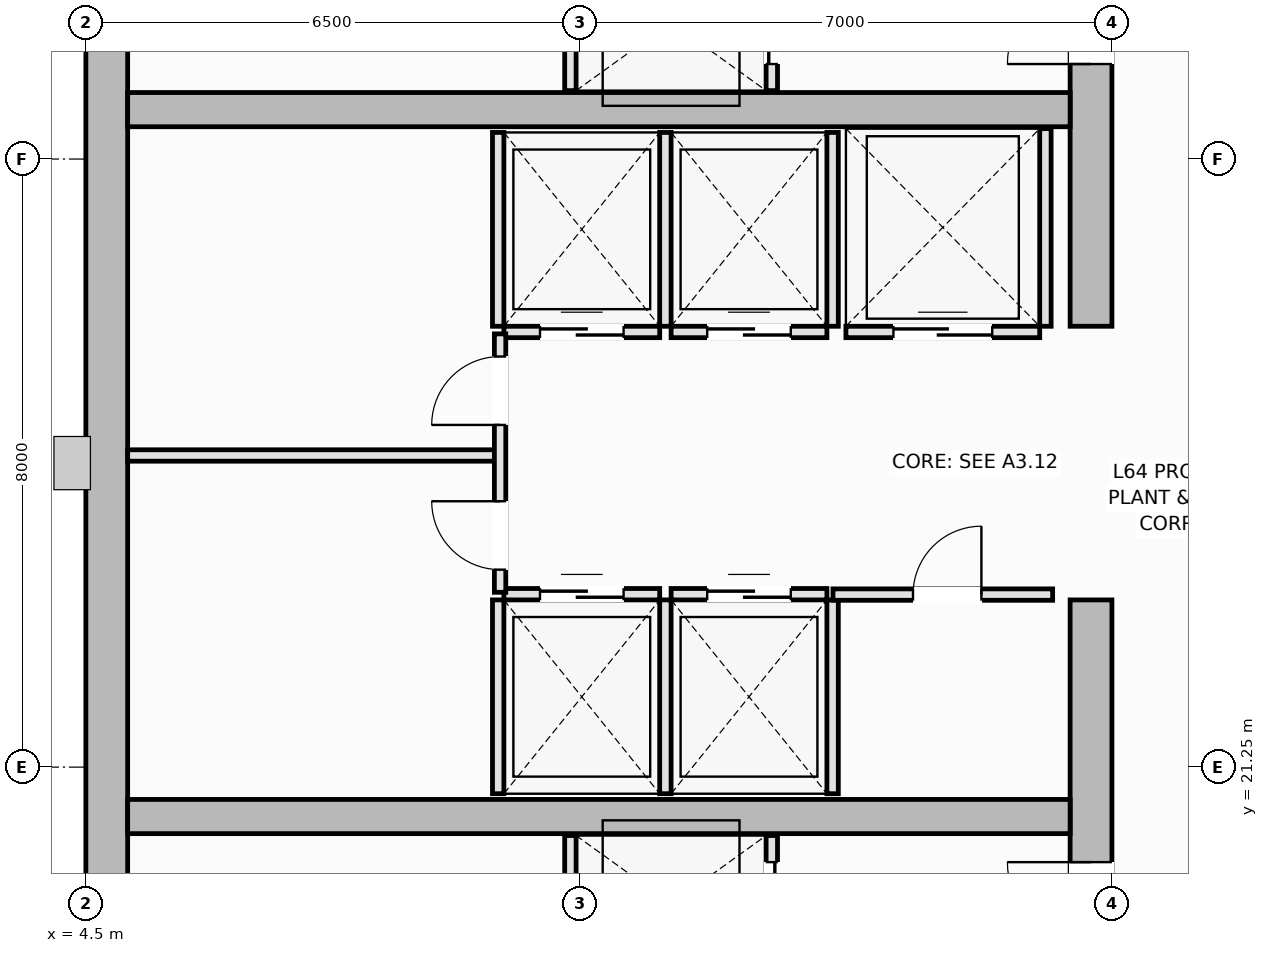
"""IFC4 building model, lengths in metres.
Left out: names, types, materials, properties, quantities, classifications, styles, units other than length and angle.
Written with IfcOpenShell. Run it as: python <this file> out.ifc"""

import sys

from ifc_helpers import new_model, si_unit, direction, frame, frame_2d, origin, place, context, subcontext, project, spatial, rectangle, extrude, element, fill, save


model = new_model("IFC4")
c1 = context("Model", 3, precision=1e-05, world=origin(), true_north=direction((0.0, 1.0)))
c2 = subcontext(c1, "Body", "Model", "MODEL_VIEW")
j1 = project(units=[si_unit("LENGTHUNIT", "METRE"), si_unit("PLANEANGLEUNIT", "RADIAN")], contexts=[c1])
p1 = place(None, origin())
s1 = spatial("IfcSite", under=j1, at=p1, CompositionType="ELEMENT")
p2 = place(p1, origin())
s2 = spatial("IfcBuilding", under=s1, at=p2, CompositionType="ELEMENT")
p3 = place(p2, frame((0.0, 0.0, 241.3)))
s3 = spatial("IfcBuildingStorey", under=s2, at=p3, CompositionType="ELEMENT", Elevation=241.3)
p4 = place(p3, frame((4.775, 14.55, 0.0), z_axis=(0.0, 0.0, 1.0), x_axis=(0.0, 1.0, 0.0)))
e1 = element("IfcWall", 1, at=p4, inside=s3, PredefinedType="SHEAR", context=c2, shape_type="SweptSolid", body=[
    extrude(rectangle(XDim=21.4, YDim=0.55, at=frame_2d((10.7, 0.0))), origin(), (0.0, 0.0, 1.0), 3.55),
])
p5 = place(p3, frame((17.725, 14.55, 0.0), z_axis=(0.0, 0.0, 1.0), x_axis=(0.0, 1.0, 0.0)))
e2 = element("IfcWall", 2, at=p5, inside=s3, PredefinedType="SHEAR", context=c2, shape_type="SweptSolid", body=[
    extrude(rectangle(XDim=8.9, YDim=0.55, at=frame_2d((4.45, 0.0))), origin(), (0.0, 0.0, 1.0), 3.55),
])
p6 = place(p5, frame((4.35, 0.0, 0.0)))
e3 = element("IfcOpeningElement", 3, at=p6, cuts=e2, PredefinedType="OPENING", context=c2, shape_type="SweptSolid", body=[
    extrude(rectangle(XDim=1.1, YDim=2.15, at=frame_2d((0.55, 1.075))), frame((0.0, 0.285, 0.0), z_axis=(0.0, -1.0, 0.0), x_axis=(1.0, 0.0, 0.0)), (0.0, 0.0, 1.0), 0.57),
])
p7 = place(p3, frame((17.725, 27.05, 0.0), z_axis=(0.0, 0.0, 1.0), x_axis=(0.0, 1.0, 0.0)))
e4 = element("IfcWall", 4, at=p7, inside=s3, PredefinedType="SHEAR", context=c2, shape_type="SweptSolid", body=[
    extrude(rectangle(XDim=8.9, YDim=0.55, at=frame_2d((4.45, 0.0))), origin(), (0.0, 0.0, 1.0), 3.55),
])
p8 = place(p7, frame((3.45, 0.0, 0.0)))
e5 = element("IfcOpeningElement", 5, at=p8, cuts=e4, PredefinedType="OPENING", context=c2, shape_type="SweptSolid", body=[
    extrude(rectangle(XDim=1.1, YDim=2.15, at=frame_2d((0.55, 1.075))), frame((0.0, 0.285, 0.0), z_axis=(0.0, -1.0, 0.0), x_axis=(1.0, 0.0, 0.0)), (0.0, 0.0, 1.0), 0.57),
])
for number, where, z_axis, x_axis in (
    (6, (5.05, 20.6, 0.0), (0.0, 0.0, 1.0), (1.0, 0.0, 0.0)),
    (7, (5.05, 29.9, 0.0), (0.0, 0.0, 1.0), (1.0, 0.0, 0.0)),
):
    element("IfcWall", number, at=place(p3, frame(where, z_axis=z_axis, x_axis=x_axis)), inside=s3, PredefinedType="SHEAR", context=c2, shape_type="SweptSolid", body=[
        extrude(rectangle(XDim=12.4, YDim=0.45, at=frame_2d((6.2, 0.0))), origin(), (0.0, 0.0, 1.0), 3.55),
    ])
p9 = place(p3, frame((10.0, 23.525, 0.0), z_axis=(0.0, 0.0, 1.0), x_axis=(1.0, 0.0, 0.0)))
e8 = element("IfcWall", 8, at=p9, inside=s3, PredefinedType="PARTITIONING", context=c2, shape_type="SweptSolid", body=[
    extrude(rectangle(XDim=2.05, YDim=0.15, at=frame_2d((1.025, 0.0))), origin(), (0.0, 0.0, 1.0), 3.39),
])
p10 = place(p9, frame((0.475, 0.0, 0.0)))
e9 = element("IfcOpeningElement", 9, at=p10, cuts=e8, PredefinedType="OPENING", context=c2, shape_type="SweptSolid", body=[
    extrude(rectangle(XDim=1.1, YDim=2.2, at=frame_2d((0.55, 1.1))), frame((0.0, 0.085, 0.0), z_axis=(0.0, -1.0, 0.0), x_axis=(1.0, 0.0, 0.0)), (0.0, 0.0, 1.0), 0.17),
])
for number, where, z_axis, x_axis in (
    (10, (9.925, 20.9, 0.0), (0.0, 0.0, 1.0), (0.0, 1.0, 0.0)),
    (11, (12.125, 20.9, 0.0), (0.0, 0.0, 1.0), (0.0, 1.0, 0.0)),
):
    element("IfcWall", number, at=place(p3, frame(where, z_axis=z_axis, x_axis=x_axis)), inside=s3, PredefinedType="PARTITIONING", context=c2, shape_type="SweptSolid", body=[
        extrude(rectangle(XDim=2.55, YDim=0.15, at=frame_2d((1.275, 0.0))), origin(), (0.0, 0.0, 1.0), 3.39),
    ])
p11 = place(p3, frame((12.2, 23.525, 0.0), z_axis=(0.0, 0.0, 1.0), x_axis=(1.0, 0.0, 0.0)))
e12 = element("IfcWall", 12, at=p11, inside=s3, PredefinedType="PARTITIONING", context=c2, shape_type="SweptSolid", body=[
    extrude(rectangle(XDim=2.05, YDim=0.15, at=frame_2d((1.025, 0.0))), origin(), (0.0, 0.0, 1.0), 3.39),
])
p12 = place(p11, frame((0.475, 0.0, 0.0)))
e13 = element("IfcOpeningElement", 13, at=p12, cuts=e12, PredefinedType="OPENING", context=c2, shape_type="SweptSolid", body=[
    extrude(rectangle(XDim=1.1, YDim=2.2, at=frame_2d((0.55, 1.1))), frame((0.0, 0.085, 0.0), z_axis=(0.0, -1.0, 0.0), x_axis=(1.0, 0.0, 0.0)), (0.0, 0.0, 1.0), 0.17),
])
p13 = place(p3, frame((14.325, 20.9, 0.0), z_axis=(0.0, 0.0, 1.0), x_axis=(0.0, 1.0, 0.0)))
e14 = element("IfcWall", 14, at=p13, inside=s3, PredefinedType="PARTITIONING", context=c2, shape_type="SweptSolid", body=[
    extrude(rectangle(XDim=2.55, YDim=0.15, at=frame_2d((1.275, 0.0))), origin(), (0.0, 0.0, 1.0), 3.39),
])
p14 = place(p3, frame((10.0, 26.975, 0.0), z_axis=(0.0, 0.0, 1.0), x_axis=(1.0, 0.0, 0.0)))
e15 = element("IfcWall", 15, at=p14, inside=s3, PredefinedType="PARTITIONING", context=c2, shape_type="SweptSolid", body=[
    extrude(rectangle(XDim=2.05, YDim=0.15, at=frame_2d((1.025, 0.0))), origin(), (0.0, 0.0, 1.0), 3.39),
])
p15 = place(p14, frame((0.475, 0.0, 0.0)))
e16 = element("IfcOpeningElement", 16, at=p15, cuts=e15, PredefinedType="OPENING", context=c2, shape_type="SweptSolid", body=[
    extrude(rectangle(XDim=1.1, YDim=2.2, at=frame_2d((0.55, 1.1))), frame((0.0, 0.085, 0.0), z_axis=(0.0, -1.0, 0.0), x_axis=(1.0, 0.0, 0.0)), (0.0, 0.0, 1.0), 0.17),
])
for number, where, z_axis, x_axis in (
    (17, (9.925, 27.05, 0.0), (0.0, 0.0, 1.0), (0.0, 1.0, 0.0)),
    (18, (12.125, 27.05, 0.0), (0.0, 0.0, 1.0), (0.0, 1.0, 0.0)),
):
    element("IfcWall", number, at=place(p3, frame(where, z_axis=z_axis, x_axis=x_axis)), inside=s3, PredefinedType="PARTITIONING", context=c2, shape_type="SweptSolid", body=[
        extrude(rectangle(XDim=2.55, YDim=0.15, at=frame_2d((1.275, 0.0))), origin(), (0.0, 0.0, 1.0), 3.39),
    ])
p16 = place(p3, frame((12.2, 26.975, 0.0), z_axis=(0.0, 0.0, 1.0), x_axis=(1.0, 0.0, 0.0)))
e19 = element("IfcWall", 19, at=p16, inside=s3, PredefinedType="PARTITIONING", context=c2, shape_type="SweptSolid", body=[
    extrude(rectangle(XDim=2.05, YDim=0.15, at=frame_2d((1.025, 0.0))), origin(), (0.0, 0.0, 1.0), 3.39),
])
p17 = place(p16, frame((0.475, 0.0, 0.0)))
e20 = element("IfcOpeningElement", 20, at=p17, cuts=e19, PredefinedType="OPENING", context=c2, shape_type="SweptSolid", body=[
    extrude(rectangle(XDim=1.1, YDim=2.2, at=frame_2d((0.55, 1.1))), frame((0.0, 0.085, 0.0), z_axis=(0.0, -1.0, 0.0), x_axis=(1.0, 0.0, 0.0)), (0.0, 0.0, 1.0), 0.17),
])
p18 = place(p3, frame((14.325, 27.05, 0.0), z_axis=(0.0, 0.0, 1.0), x_axis=(0.0, 1.0, 0.0)))
e21 = element("IfcWall", 21, at=p18, inside=s3, PredefinedType="PARTITIONING", context=c2, shape_type="SweptSolid", body=[
    extrude(rectangle(XDim=2.55, YDim=0.15, at=frame_2d((1.275, 0.0))), origin(), (0.0, 0.0, 1.0), 3.39),
])
p19 = place(p3, frame((14.5, 26.975, 0.0), z_axis=(0.0, 0.0, 1.0), x_axis=(1.0, 0.0, 0.0)))
e22 = element("IfcWall", 22, at=p19, inside=s3, PredefinedType="PARTITIONING", context=c2, shape_type="SweptSolid", body=[
    extrude(rectangle(XDim=2.55, YDim=0.15, at=frame_2d((1.275, 0.0))), origin(), (0.0, 0.0, 1.0), 3.39),
])
p20 = place(p19, frame((0.625, 0.0, 0.0)))
e23 = element("IfcOpeningElement", 23, at=p20, cuts=e22, PredefinedType="OPENING", context=c2, shape_type="SweptSolid", body=[
    extrude(rectangle(XDim=1.3, YDim=2.2, at=frame_2d((0.65, 1.1))), frame((0.0, 0.085, 0.0), z_axis=(0.0, -1.0, 0.0), x_axis=(1.0, 0.0, 0.0)), (0.0, 0.0, 1.0), 0.17),
])
p21 = place(p3, frame((17.125, 27.05, 0.0), z_axis=(0.0, 0.0, 1.0), x_axis=(0.0, 1.0, 0.0)))
e24 = element("IfcWall", 24, at=p21, inside=s3, PredefinedType="PARTITIONING", context=c2, shape_type="SweptSolid", body=[
    extrude(rectangle(XDim=2.6, YDim=0.15, at=frame_2d((1.3, 0.0))), origin(), (0.0, 0.0, 1.0), 3.39),
])
p22 = place(p3, frame((10.875, 18.55, 0.0), z_axis=(0.0, 0.0, 1.0), x_axis=(0.0, 1.0, 0.0)))
e25 = element("IfcWall", 25, at=p22, inside=s3, PredefinedType="PARTITIONING", context=c2, shape_type="SweptSolid", body=[
    extrude(rectangle(XDim=1.8, YDim=0.15, at=frame_2d((0.9, 0.0))), origin(), (0.0, 0.0, 1.0), 3.39),
])
p23 = place(p3, frame((13.525, 18.55, 0.0), z_axis=(0.0, 0.0, 1.0), x_axis=(0.0, 1.0, 0.0)))
e26 = element("IfcWall", 26, at=p23, inside=s3, PredefinedType="PARTITIONING", context=c2, shape_type="SweptSolid", body=[
    extrude(rectangle(XDim=1.8, YDim=0.15, at=frame_2d((0.9, 0.0))), origin(), (0.0, 0.0, 1.0), 3.39),
])
p24 = place(p23, frame((0.35, 0.0, 0.0)))
e27 = element("IfcOpeningElement", 27, at=p24, cuts=e26, PredefinedType="OPENING", context=c2, shape_type="SweptSolid", body=[
    extrude(rectangle(XDim=1.1, YDim=2.2, at=frame_2d((0.55, 1.1))), frame((0.0, 0.085, 0.0), z_axis=(0.0, -1.0, 0.0), x_axis=(1.0, 0.0, 0.0)), (0.0, 0.0, 1.0), 0.17),
])
p25 = place(p3, frame((10.875, 30.15, 0.0), z_axis=(0.0, 0.0, 1.0), x_axis=(0.0, 1.0, 0.0)))
e28 = element("IfcWall", 28, at=p25, inside=s3, PredefinedType="PARTITIONING", context=c2, shape_type="SweptSolid", body=[
    extrude(rectangle(XDim=1.8, YDim=0.15, at=frame_2d((0.9, 0.0))), origin(), (0.0, 0.0, 1.0), 3.39),
])
p26 = place(p3, frame((13.525, 30.15, 0.0), z_axis=(0.0, 0.0, 1.0), x_axis=(0.0, 1.0, 0.0)))
e29 = element("IfcWall", 29, at=p26, inside=s3, PredefinedType="PARTITIONING", context=c2, shape_type="SweptSolid", body=[
    extrude(rectangle(XDim=1.8, YDim=0.15, at=frame_2d((0.9, 0.0))), origin(), (0.0, 0.0, 1.0), 3.39),
])
p27 = place(p26, frame((0.35, 0.0, 0.0)))
e30 = element("IfcOpeningElement", 30, at=p27, cuts=e29, PredefinedType="OPENING", context=c2, shape_type="SweptSolid", body=[
    extrude(rectangle(XDim=1.1, YDim=2.2, at=frame_2d((0.55, 1.1))), frame((0.0, 0.085, 0.0), z_axis=(0.0, -1.0, 0.0), x_axis=(1.0, 0.0, 0.0)), (0.0, 0.0, 1.0), 0.17),
])
p28 = place(p3, frame((5.05, 25.35, 0.0), z_axis=(0.0, 0.0, 1.0), x_axis=(1.0, 0.0, 0.0)))
e31 = element("IfcWall", 31, at=p28, inside=s3, PredefinedType="PARTITIONING", context=c2, shape_type="SweptSolid", body=[
    extrude(rectangle(XDim=4.9, YDim=0.15, at=frame_2d((2.45, 0.0))), origin(), (0.0, 0.0, 1.0), 3.39),
])
p29 = place(p3, frame((9.95, 23.55, 0.0), z_axis=(0.0, 0.0, 1.0), x_axis=(0.0, 1.0, 0.0)))
e32 = element("IfcWall", 32, at=p29, inside=s3, PredefinedType="PARTITIONING", context=c2, shape_type="SweptSolid", body=[
    extrude(rectangle(XDim=3.4, YDim=0.15, at=frame_2d((1.7, 0.0))), origin(), (0.0, 0.0, 1.0), 3.39),
])
p30 = place(p29, frame((0.298, 0.0, 0.0)))
e33 = element("IfcOpeningElement", 33, at=p30, cuts=e32, PredefinedType="OPENING", context=c2, shape_type="SweptSolid", body=[
    extrude(rectangle(XDim=0.9, YDim=2.1, at=frame_2d((0.45, 1.05))), frame((0.0, 0.085, 0.0), z_axis=(0.0, -1.0, 0.0), x_axis=(1.0, 0.0, 0.0)), (0.0, 0.0, 1.0), 0.17),
])
p31 = place(p29, frame((2.202, 0.0, 0.0)))
e34 = element("IfcOpeningElement", 34, at=p31, cuts=e32, PredefinedType="OPENING", context=c2, shape_type="SweptSolid", body=[
    extrude(rectangle(XDim=0.9, YDim=2.1, at=frame_2d((0.45, 1.05))), frame((0.0, 0.085, 0.0), z_axis=(0.0, -1.0, 0.0), x_axis=(1.0, 0.0, 0.0)), (0.0, 0.0, 1.0), 0.17),
])
p32 = place(p3, frame((14.33, 23.52, 0.0), z_axis=(0.0, 0.0, 1.0), x_axis=(1.0, 0.0, 0.0)))
e35 = element("IfcWall", 35, at=p32, inside=s3, PredefinedType="PARTITIONING", context=c2, shape_type="SweptSolid", body=[
    extrude(rectangle(XDim=2.89, YDim=0.15, at=frame_2d((1.445, 0.0))), origin(), (0.0, 0.0, 1.0), 3.39),
])
p33 = place(p32, frame((1.053, 0.0, 0.0)))
e36 = element("IfcOpeningElement", 36, at=p33, cuts=e35, PredefinedType="OPENING", context=c2, shape_type="SweptSolid", body=[
    extrude(rectangle(XDim=0.9, YDim=2.1, at=frame_2d((0.45, 1.05))), frame((0.0, 0.085, 0.0), z_axis=(0.0, -1.0, 0.0), x_axis=(1.0, 0.0, 0.0)), (0.0, 0.0, 1.0), 0.17),
])
p34 = place(p10, origin())
e37 = element("IfcDoor", 37, at=p34, inside=s3, OperationType="DOUBLE_DOOR_SLIDING", PredefinedType="DOOR", context=c2, shape_type="SweptSolid", body=[
    extrude(rectangle(XDim=1.1, YDim=2.2, at=frame_2d((0.55, 1.1))), frame((0.0, 0.025, 0.0), z_axis=(0.0, -1.0, 0.0), x_axis=(1.0, 0.0, 0.0)), (0.0, 0.0, 1.0), 0.05),
])
fill(e9, e37)
p35 = place(p12, origin())
e38 = element("IfcDoor", 38, at=p35, inside=s3, OperationType="DOUBLE_DOOR_SLIDING", PredefinedType="DOOR", context=c2, shape_type="SweptSolid", body=[
    extrude(rectangle(XDim=1.1, YDim=2.2, at=frame_2d((0.55, 1.1))), frame((0.0, 0.025, 0.0), z_axis=(0.0, -1.0, 0.0), x_axis=(1.0, 0.0, 0.0)), (0.0, 0.0, 1.0), 0.05),
])
fill(e13, e38)
p36 = place(p15, origin())
e39 = element("IfcDoor", 39, at=p36, inside=s3, OperationType="DOUBLE_DOOR_SLIDING", PredefinedType="DOOR", context=c2, shape_type="SweptSolid", body=[
    extrude(rectangle(XDim=1.1, YDim=2.2, at=frame_2d((0.55, 1.1))), frame((0.0, 0.025, 0.0), z_axis=(0.0, -1.0, 0.0), x_axis=(1.0, 0.0, 0.0)), (0.0, 0.0, 1.0), 0.05),
])
fill(e16, e39)
p37 = place(p17, origin())
e40 = element("IfcDoor", 40, at=p37, inside=s3, OperationType="DOUBLE_DOOR_SLIDING", PredefinedType="DOOR", context=c2, shape_type="SweptSolid", body=[
    extrude(rectangle(XDim=1.1, YDim=2.2, at=frame_2d((0.55, 1.1))), frame((0.0, 0.025, 0.0), z_axis=(0.0, -1.0, 0.0), x_axis=(1.0, 0.0, 0.0)), (0.0, 0.0, 1.0), 0.05),
])
fill(e20, e40)
p38 = place(p20, origin())
e41 = element("IfcDoor", 41, at=p38, inside=s3, OperationType="DOUBLE_DOOR_SLIDING", PredefinedType="DOOR", context=c2, shape_type="SweptSolid", body=[
    extrude(rectangle(XDim=1.3, YDim=2.2, at=frame_2d((0.65, 1.1))), frame((0.0, 0.025, 0.0), z_axis=(0.0, -1.0, 0.0), x_axis=(1.0, 0.0, 0.0)), (0.0, 0.0, 1.0), 0.05),
])
fill(e23, e41)
p39 = place(p24, origin())
e42 = element("IfcDoor", 42, at=p39, inside=s3, OperationType="DOUBLE_DOOR_SLIDING", PredefinedType="DOOR", context=c2, shape_type="SweptSolid", body=[
    extrude(rectangle(XDim=1.1, YDim=2.2, at=frame_2d((0.55, 1.1))), frame((0.0, 0.025, 0.0), z_axis=(0.0, -1.0, 0.0), x_axis=(1.0, 0.0, 0.0)), (0.0, 0.0, 1.0), 0.05),
])
fill(e27, e42)
p40 = place(p27, origin())
e43 = element("IfcDoor", 43, at=p40, inside=s3, OperationType="DOUBLE_DOOR_SLIDING", PredefinedType="DOOR", context=c2, shape_type="SweptSolid", body=[
    extrude(rectangle(XDim=1.1, YDim=2.2, at=frame_2d((0.55, 1.1))), frame((0.0, 0.025, 0.0), z_axis=(0.0, -1.0, 0.0), x_axis=(1.0, 0.0, 0.0)), (0.0, 0.0, 1.0), 0.05),
])
fill(e30, e43)
p41 = place(p6, origin())
e44 = element("IfcDoor", 44, at=p41, inside=s3, OperationType="SINGLE_SWING_RIGHT", PredefinedType="DOOR", context=c2, shape_type="SweptSolid", body=[
    extrude(rectangle(XDim=1.1, YDim=2.15, at=frame_2d((0.55, 1.075))), frame((0.0, 0.025, 0.0), z_axis=(0.0, -1.0, 0.0), x_axis=(1.0, 0.0, 0.0)), (0.0, 0.0, 1.0), 0.05),
])
fill(e3, e44)
p42 = place(p8, origin())
e45 = element("IfcDoor", 45, at=p42, inside=s3, OperationType="SINGLE_SWING_LEFT", PredefinedType="DOOR", context=c2, shape_type="SweptSolid", body=[
    extrude(rectangle(XDim=1.1, YDim=2.15, at=frame_2d((0.55, 1.075))), frame((0.0, 0.025, 0.0), z_axis=(0.0, -1.0, 0.0), x_axis=(1.0, 0.0, 0.0)), (0.0, 0.0, 1.0), 0.05),
])
fill(e5, e45)
p43 = place(p30, origin())
e46 = element("IfcDoor", 46, at=p43, inside=s3, OperationType="SINGLE_SWING_RIGHT", PredefinedType="DOOR", context=c2, shape_type="SweptSolid", body=[
    extrude(rectangle(XDim=0.9, YDim=2.1, at=frame_2d((0.45, 1.05))), frame((0.0, 0.025, 0.0), z_axis=(0.0, -1.0, 0.0), x_axis=(1.0, 0.0, 0.0)), (0.0, 0.0, 1.0), 0.05),
])
fill(e33, e46)
p44 = place(p31, origin())
e47 = element("IfcDoor", 47, at=p44, inside=s3, OperationType="SINGLE_SWING_LEFT", PredefinedType="DOOR", context=c2, shape_type="SweptSolid", body=[
    extrude(rectangle(XDim=0.9, YDim=2.1, at=frame_2d((0.45, 1.05))), frame((0.0, 0.025, 0.0), z_axis=(0.0, -1.0, 0.0), x_axis=(1.0, 0.0, 0.0)), (0.0, 0.0, 1.0), 0.05),
])
fill(e34, e47)
p45 = place(p33, origin())
e48 = element("IfcDoor", 48, at=p45, inside=s3, OperationType="SINGLE_SWING_RIGHT", PredefinedType="DOOR", context=c2, shape_type="SweptSolid", body=[
    extrude(rectangle(XDim=0.9, YDim=2.1, at=frame_2d((0.45, 1.05))), frame((0.0, 0.025, 0.0), z_axis=(0.0, -1.0, 0.0), x_axis=(1.0, 0.0, 0.0)), (0.0, 0.0, 1.0), 0.05),
])
fill(e36, e48)
save(model, sys.argv[1])
